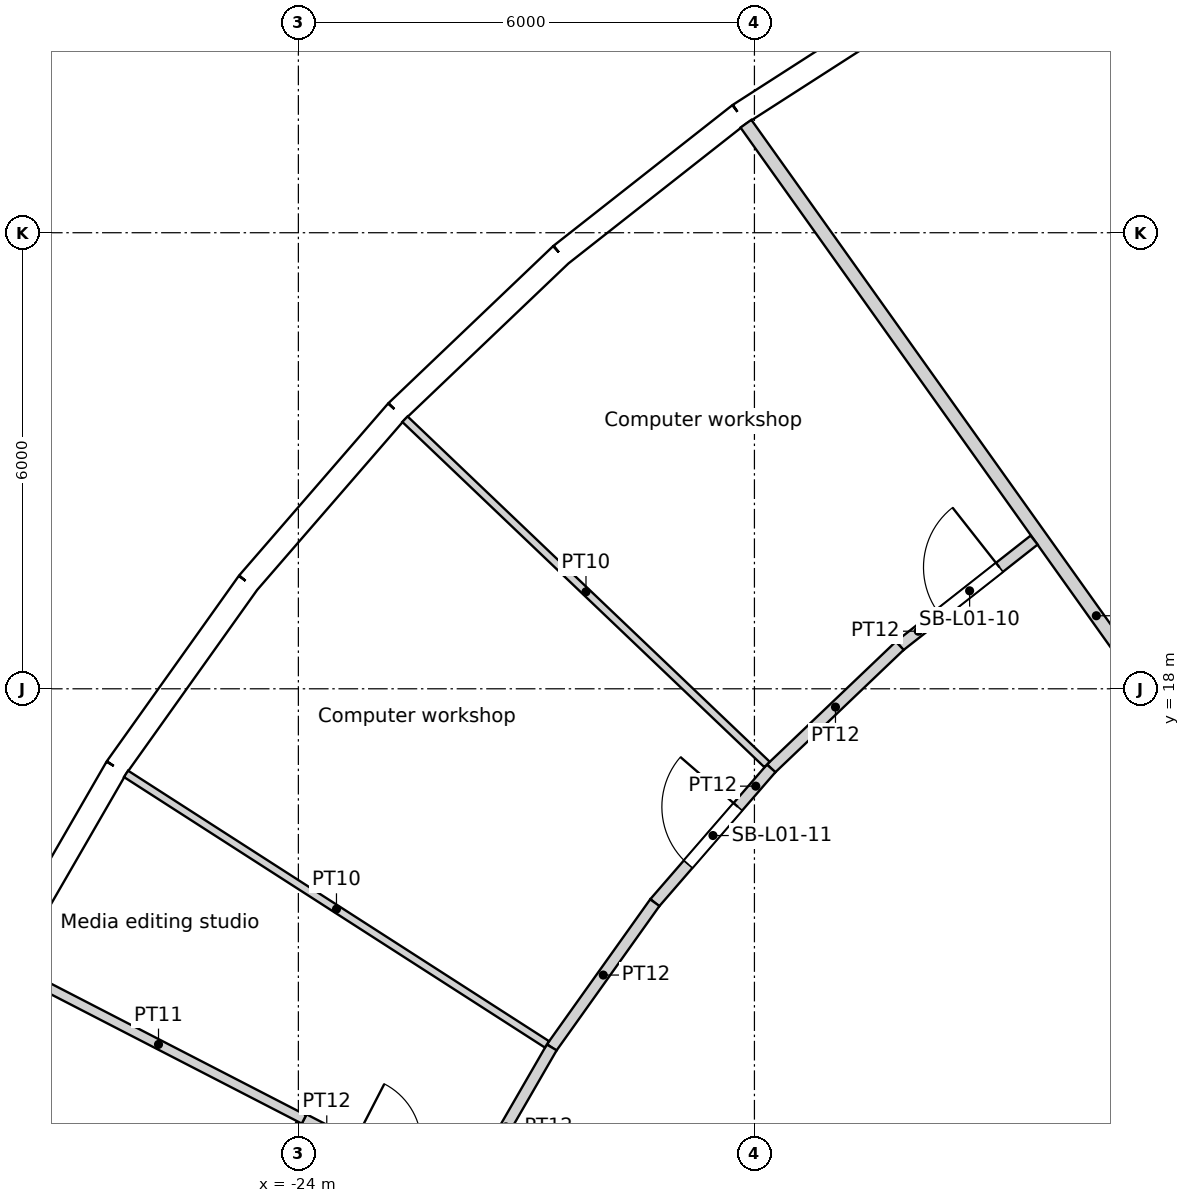
"""IFC4 building model, lengths in metres.
Left out: names, types, materials, properties, quantities, classifications, styles, units other than length and angle.
Written with IfcOpenShell. Run it as: python <this file> out.ifc"""

import sys

from ifc_helpers import new_model, si_unit, direction, frame, frame_2d, origin, origin_2d, place, context, subcontext, project, spatial, rectangle, circle, extrude, element, fill, save


model = new_model("IFC4")
c1 = context("Model", 3, precision=1e-05, world=origin(), true_north=direction((0.0, 1.0)))
c2 = subcontext(c1, "Body", "Model", "MODEL_VIEW")
j1 = project(units=[si_unit("LENGTHUNIT", "METRE"), si_unit("PLANEANGLEUNIT", "RADIAN")], contexts=[c1])
p1 = place(None, origin())
s1 = spatial("IfcSite", under=j1, at=p1, CompositionType="ELEMENT")
p2 = place(p1, origin())
s2 = spatial("IfcBuilding", under=s1, at=p2, CompositionType="ELEMENT")
p3 = place(p2, frame((0.0, 0.0, 9.0)))
s3 = spatial("IfcBuildingStorey", under=s2, at=p3, CompositionType="ELEMENT", Elevation=9.0)
for number, where, z_axis, x_axis in (
    (1, (-15.137, 26.219, 0.0), (0.0, 0.0, 1.0), (1.0, 0.0, 0.0)),
    (2, (-19.826, 22.88, 0.0), (0.0, 0.0, 1.0), (1.0, 0.0, 0.0)),
    (3, (-23.797, 18.715, 0.0), (0.0, 0.0, 1.0), (1.0, 0.0, 0.0)),
    (4, (-26.909, 13.873, 0.0), (0.0, 0.0, 1.0), (1.0, 0.0, 0.0)),
):
    element("IfcColumn", number, at=place(p3, frame(where, z_axis=z_axis, x_axis=x_axis)), inside=s3, PredefinedType="COLUMN", context=c2, shape_type="SweptSolid", body=[
        extrude(circle(Radius=0.7, at=origin_2d()), origin(), (0.0, 0.0, 1.0), 4.8),
    ])
for number, where, z_axis, x_axis in (
    (5, (-16.846, 17.855, 0.0), (0.0, 0.0, 1.0), (1.0, 0.0, 0.0)),
    (6, (-20.509, 13.489, 0.0), (0.0, 0.0, 1.0), (1.0, 0.0, 0.0)),
):
    element("IfcColumn", number, at=place(p3, frame(where, z_axis=z_axis, x_axis=x_axis)), inside=s3, PredefinedType="COLUMN", context=c2, shape_type="SweptSolid", body=[
        extrude(circle(Radius=0.75, at=origin_2d()), origin(), (0.0, 0.0, 1.0), 4.8),
    ])
p4 = place(p3, frame((-13.798, 12.802, 0.0), z_axis=(0.0, 0.0, 1.0), x_axis=(1.0, 0.0, 0.0)))
e7 = element("IfcColumn", 7, at=p4, inside=s3, PredefinedType="COLUMN", context=c2, shape_type="SweptSolid", body=[
    extrude(circle(Radius=0.8, at=origin_2d()), origin(), (0.0, 0.0, 1.0), 4.8),
])
p5 = place(p3, frame((-15.687, 27.171, 0.0), z_axis=(0.0, 0.0, 1.0), x_axis=(-0.841242231846, -0.540658401727, 0.0)))
e8 = element("IfcWall", 8, at=p5, inside=s3, PredefinedType="SOLIDWALL", context=c2, shape_type="SweptSolid", body=[
    extrude(rectangle(XDim=2.986, YDim=0.3, at=frame_2d((1.493, 0.0))), origin(), (0.0, 0.0, 1.0), 4.35),
])
p6 = place(p5, frame((1.493, 0.0, 2.0)))
e9 = element("IfcOpeningElement", 9, at=p6, cuts=e8, PredefinedType="OPENING", context=c2, shape_type="SweptSolid", body=[
    extrude(circle(Radius=1.2, at=origin_2d()), frame((0.0, 0.16, 0.0), z_axis=(0.0, -1.0, 0.0), x_axis=(1.0, 0.0, 0.0)), (0.0, 0.0, 1.0), 0.32),
])
p7 = place(p3, frame((-18.199, 25.557, 0.0), z_axis=(0.0, 0.0, 1.0), x_axis=(-0.786043032847, -0.618171780747, 0.0)))
e10 = element("IfcWall", 10, at=p7, inside=s3, PredefinedType="SOLIDWALL", context=c2, shape_type="SweptSolid", body=[
    extrude(rectangle(XDim=2.986, YDim=0.3, at=frame_2d((1.493, 0.0))), origin(), (0.0, 0.0, 1.0), 4.35),
])
p8 = place(p7, frame((1.493, 0.0, 2.0)))
e11 = element("IfcOpeningElement", 11, at=p8, cuts=e10, PredefinedType="OPENING", context=c2, shape_type="SweptSolid", body=[
    extrude(circle(Radius=1.2, at=origin_2d()), frame((0.0, 0.16, 0.0), z_axis=(0.0, -1.0, 0.0), x_axis=(1.0, 0.0, 0.0)), (0.0, 0.0, 1.0), 0.32),
])
p9 = place(p3, frame((-20.546, 23.711, 0.0), z_axis=(0.0, 0.0, 1.0), x_axis=(-0.723750841228, -0.690061388444, 0.0)))
e12 = element("IfcWall", 12, at=p9, inside=s3, PredefinedType="SOLIDWALL", context=c2, shape_type="SweptSolid", body=[
    extrude(rectangle(XDim=2.986, YDim=0.3, at=frame_2d((1.493, 0.0))), origin(), (0.0, 0.0, 1.0), 4.35),
])
p10 = place(p9, frame((1.493, 0.0, 2.0)))
e13 = element("IfcOpeningElement", 13, at=p10, cuts=e12, PredefinedType="OPENING", context=c2, shape_type="SweptSolid", body=[
    extrude(circle(Radius=1.2, at=origin_2d()), frame((0.0, 0.16, 0.0), z_axis=(0.0, -1.0, 0.0), x_axis=(1.0, 0.0, 0.0)), (0.0, 0.0, 1.0), 0.32),
])
p11 = place(p3, frame((-22.707, 21.651, 0.0), z_axis=(0.0, 0.0, 1.0), x_axis=(-0.654809121128, -0.755794294029, 0.0)))
e14 = element("IfcWall", 14, at=p11, inside=s3, PredefinedType="SOLIDWALL", context=c2, shape_type="SweptSolid", body=[
    extrude(rectangle(XDim=2.986, YDim=0.3, at=frame_2d((1.493, 0.0))), origin(), (0.0, 0.0, 1.0), 4.35),
])
p12 = place(p11, frame((1.493, 0.0, 2.0)))
e15 = element("IfcOpeningElement", 15, at=p12, cuts=e14, PredefinedType="OPENING", context=c2, shape_type="SweptSolid", body=[
    extrude(circle(Radius=1.2, at=origin_2d()), frame((0.0, 0.16, 0.0), z_axis=(0.0, -1.0, 0.0), x_axis=(1.0, 0.0, 0.0)), (0.0, 0.0, 1.0), 0.32),
])
p13 = place(p3, frame((-24.662, 19.394, 0.0), z_axis=(0.0, 0.0, 1.0), x_axis=(-0.580100533892, -0.814544885551, 0.0)))
e16 = element("IfcWall", 16, at=p13, inside=s3, PredefinedType="SOLIDWALL", context=c2, shape_type="SweptSolid", body=[
    extrude(rectangle(XDim=2.986, YDim=0.3, at=frame_2d((1.493, 0.0))), origin(), (0.0, 0.0, 1.0), 4.35),
])
p14 = place(p13, frame((1.493, 0.0, 2.0)))
e17 = element("IfcOpeningElement", 17, at=p14, cuts=e16, PredefinedType="OPENING", context=c2, shape_type="SweptSolid", body=[
    extrude(circle(Radius=1.2, at=origin_2d()), frame((0.0, 0.16, 0.0), z_axis=(0.0, -1.0, 0.0), x_axis=(1.0, 0.0, 0.0)), (0.0, 0.0, 1.0), 0.32),
])
p15 = place(p3, frame((-26.394, 16.962, 0.0), z_axis=(0.0, 0.0, 1.0), x_axis=(-0.500017373705, -0.866015372839, 0.0)))
e18 = element("IfcWall", 18, at=p15, inside=s3, PredefinedType="SOLIDWALL", context=c2, shape_type="SweptSolid", body=[
    extrude(rectangle(XDim=2.986, YDim=0.3, at=frame_2d((1.493, 0.0))), origin(), (0.0, 0.0, 1.0), 4.35),
])
p16 = place(p15, frame((1.493, 0.0, 2.0)))
e19 = element("IfcOpeningElement", 19, at=p16, cuts=e18, PredefinedType="OPENING", context=c2, shape_type="SweptSolid", body=[
    extrude(circle(Radius=1.2, at=origin_2d()), frame((0.0, 0.16, 0.0), z_axis=(0.0, -1.0, 0.0), x_axis=(1.0, 0.0, 0.0)), (0.0, 0.0, 1.0), 0.32),
])
p17 = place(p3, frame((-27.753, 14.308, 0.0), z_axis=(0.0, 0.0, 1.0), x_axis=(0.888823380171, -0.458249930563, 0.0)))
e20 = element("IfcWall", 20, at=p17, inside=s3, PredefinedType="PARTITIONING", context=c2, shape_type="SweptSolid", body=[
    extrude(rectangle(XDim=4.305, YDim=0.125, at=frame_2d((2.152, 0.0))), origin(), (0.0, 0.0, 1.0), 3.75),
])
p18 = place(p3, frame((-26.268, 16.881, 0.0), z_axis=(0.0, 0.0, 1.0), x_axis=(0.841267639797, -0.540618865959, 0.0)))
e21 = element("IfcWall", 21, at=p18, inside=s3, PredefinedType="PARTITIONING", context=c2, shape_type="SweptSolid", body=[
    extrude(rectangle(XDim=6.583, YDim=0.1, at=frame_2d((3.291, 0.0))), origin(), (0.0, 0.0, 1.0), 3.75),
])
p19 = place(p3, frame((-24.991, 10.005, 0.0), z_axis=(0.0, 0.0, 1.0), x_axis=(0.415481321012, 0.90960171058, 0.0)))
e22 = element("IfcWall", 22, at=p19, inside=s3, PredefinedType="PARTITIONING", context=c2, shape_type="SweptSolid", body=[
    extrude(rectangle(XDim=2.487, YDim=0.15, at=frame_2d((1.243, 0.0))), origin(), (0.0, 0.0, 1.0), 3.75),
])
p20 = place(p19, frame((0.831, 0.0, 0.0)))
e23 = element("IfcOpeningElement", 23, at=p20, cuts=e22, PredefinedType="OPENING", context=c2, shape_type="SweptSolid", body=[
    extrude(rectangle(XDim=0.9, YDim=2.1, at=frame_2d((0.45, 1.05))), frame((0.0, 0.075, 0.0), z_axis=(0.0, -1.0, 0.0), x_axis=(1.0, 0.0, 0.0)), (0.0, 0.0, 1.0), 0.15),
])
p21 = place(p3, frame((-23.927, 12.335, 0.0), z_axis=(0.0, 0.0, 1.0), x_axis=(0.888827725997, -0.458241501283, 0.0)))
e24 = element("IfcWall", 24, at=p21, inside=s3, PredefinedType="PARTITIONING", context=c2, shape_type="SweptSolid", body=[
    extrude(rectangle(XDim=2.278, YDim=0.15, at=frame_2d((1.139, 0.0))), origin(), (0.0, 0.0, 1.0), 3.75),
])
p22 = place(p21, frame((0.726, 0.0, 0.0)))
e25 = element("IfcOpeningElement", 25, at=p22, cuts=e24, PredefinedType="OPENING", context=c2, shape_type="SweptSolid", body=[
    extrude(rectangle(XDim=0.9, YDim=2.1, at=frame_2d((0.45, 1.05))), frame((0.0, 0.075, 0.0), z_axis=(0.0, -1.0, 0.0), x_axis=(1.0, 0.0, 0.0)), (0.0, 0.0, 1.0), 0.15),
])
p23 = place(p3, frame((-22.598, 21.547, 0.0), z_axis=(0.0, 0.0, 1.0), x_axis=(0.723762960711, -0.690048677054, 0.0)))
e26 = element("IfcWall", 26, at=p23, inside=s3, PredefinedType="PARTITIONING", context=c2, shape_type="SweptSolid", body=[
    extrude(rectangle(XDim=6.583, YDim=0.1, at=frame_2d((3.291, 0.0))), origin(), (0.0, 0.0, 1.0), 3.75),
])
p24 = place(p3, frame((-20.667, 13.282, 0.0), z_axis=(0.0, 0.0, 1.0), x_axis=(-0.50003483453, -0.866005291125, 0.0)))
e27 = element("IfcWall", 27, at=p24, inside=s3, PredefinedType="PARTITIONING", context=c2, shape_type="SweptSolid", body=[
    extrude(rectangle(XDim=2.413, YDim=0.15, at=frame_2d((1.207, 0.0))), origin(), (0.0, 0.0, 1.0), 3.75),
])
p25 = place(p3, frame((-19.311, 15.186, 0.0), z_axis=(0.0, 0.0, 1.0), x_axis=(-0.580032319147, -0.814593462252, 0.0)))
e28 = element("IfcWall", 28, at=p25, inside=s3, PredefinedType="PARTITIONING", context=c2, shape_type="SweptSolid", body=[
    extrude(rectangle(XDim=2.338, YDim=0.15, at=frame_2d((1.169, 0.0))), origin(), (0.0, 0.0, 1.0), 3.75),
])
p26 = place(p3, frame((-18.112, 25.435, 0.0), z_axis=(0.0, 0.0, 1.0), x_axis=(0.580054828861, -0.814577433713, 0.0)))
e29 = element("IfcWall", 29, at=p26, inside=s3, PredefinedType="PARTITIONING", context=c2, shape_type="SweptSolid", body=[
    extrude(rectangle(XDim=15.894, YDim=0.175, at=frame_2d((7.947, 0.0))), origin(), (0.0, 0.0, 1.0), 3.75),
])
p27 = place(p3, frame((-19.311, 15.186, 0.0), z_axis=(0.0, 0.0, 1.0), x_axis=(0.654866925236, 0.755744209526, 0.0)))
e30 = element("IfcWall", 30, at=p27, inside=s3, PredefinedType="PARTITIONING", context=c2, shape_type="SweptSolid", body=[
    extrude(rectangle(XDim=2.338, YDim=0.15, at=frame_2d((1.169, 0.0))), origin(), (0.0, 0.0, 1.0), 3.75),
])
p28 = place(p27, frame((0.669, 0.0, 0.0)))
e31 = element("IfcOpeningElement", 31, at=p28, cuts=e30, PredefinedType="OPENING", context=c2, shape_type="SweptSolid", body=[
    extrude(rectangle(XDim=1.0, YDim=2.1, at=frame_2d((0.5, 1.05))), frame((0.0, 0.075, 0.0), z_axis=(0.0, -1.0, 0.0), x_axis=(1.0, 0.0, 0.0)), (0.0, 0.0, 1.0), 0.15),
])
p29 = place(p3, frame((-16.088, 18.566, 0.0), z_axis=(0.0, 0.0, 1.0), x_axis=(-0.723668407542, -0.690147836283, 0.0)))
e32 = element("IfcWall", 32, at=p29, inside=s3, PredefinedType="PARTITIONING", context=c2, shape_type="SweptSolid", body=[
    extrude(rectangle(XDim=2.338, YDim=0.15, at=frame_2d((1.169, 0.0))), origin(), (0.0, 0.0, 1.0), 3.75),
])
p30 = place(p3, frame((-16.088, 18.566, 0.0), z_axis=(0.0, 0.0, 1.0), x_axis=(0.786084691739, 0.618118805258, 0.0)))
e33 = element("IfcWall", 33, at=p30, inside=s3, PredefinedType="PARTITIONING", context=c2, shape_type="SweptSolid", body=[
    extrude(rectangle(XDim=2.249, YDim=0.15, at=frame_2d((1.124, 0.0))), origin(), (0.0, 0.0, 1.0), 3.75),
])
p31 = place(p30, frame((0.669, 0.0, 0.0)))
e34 = element("IfcOpeningElement", 34, at=p31, cuts=e33, PredefinedType="OPENING", context=c2, shape_type="SweptSolid", body=[
    extrude(rectangle(XDim=1.0, YDim=2.1, at=frame_2d((0.5, 1.05))), frame((0.0, 0.075, 0.0), z_axis=(0.0, -1.0, 0.0), x_axis=(1.0, 0.0, 0.0)), (0.0, 0.0, 1.0), 0.15),
])
p32 = place(p6, origin())
e35 = element("IfcWindow", 35, at=p32, inside=s3, PartitioningType="SINGLE_PANEL", PredefinedType="WINDOW", context=c2, shape_type="SweptSolid", body=[
    extrude(circle(Radius=1.2, at=origin_2d()), frame((0.0, 0.12, 0.0), z_axis=(0.0, -1.0, 0.0), x_axis=(1.0, 0.0, 0.0)), (0.0, 0.0, 1.0), 0.1),
])
fill(e9, e35)
p33 = place(p8, origin())
e36 = element("IfcWindow", 36, at=p33, inside=s3, PartitioningType="SINGLE_PANEL", PredefinedType="WINDOW", context=c2, shape_type="SweptSolid", body=[
    extrude(circle(Radius=1.2, at=origin_2d()), frame((0.0, 0.12, 0.0), z_axis=(0.0, -1.0, 0.0), x_axis=(1.0, 0.0, 0.0)), (0.0, 0.0, 1.0), 0.1),
])
fill(e11, e36)
p34 = place(p10, origin())
e37 = element("IfcWindow", 37, at=p34, inside=s3, PartitioningType="SINGLE_PANEL", PredefinedType="WINDOW", context=c2, shape_type="SweptSolid", body=[
    extrude(circle(Radius=1.2, at=origin_2d()), frame((0.0, 0.12, 0.0), z_axis=(0.0, -1.0, 0.0), x_axis=(1.0, 0.0, 0.0)), (0.0, 0.0, 1.0), 0.1),
])
fill(e13, e37)
p35 = place(p12, origin())
e38 = element("IfcWindow", 38, at=p35, inside=s3, PartitioningType="SINGLE_PANEL", PredefinedType="WINDOW", context=c2, shape_type="SweptSolid", body=[
    extrude(circle(Radius=1.2, at=origin_2d()), frame((0.0, 0.12, 0.0), z_axis=(0.0, -1.0, 0.0), x_axis=(1.0, 0.0, 0.0)), (0.0, 0.0, 1.0), 0.1),
])
fill(e15, e38)
p36 = place(p14, origin())
e39 = element("IfcWindow", 39, at=p36, inside=s3, PartitioningType="SINGLE_PANEL", PredefinedType="WINDOW", context=c2, shape_type="SweptSolid", body=[
    extrude(circle(Radius=1.2, at=origin_2d()), frame((0.0, 0.12, 0.0), z_axis=(0.0, -1.0, 0.0), x_axis=(1.0, 0.0, 0.0)), (0.0, 0.0, 1.0), 0.1),
])
fill(e17, e39)
p37 = place(p16, origin())
e40 = element("IfcWindow", 40, at=p37, inside=s3, PartitioningType="SINGLE_PANEL", PredefinedType="WINDOW", context=c2, shape_type="SweptSolid", body=[
    extrude(circle(Radius=1.2, at=origin_2d()), frame((0.0, 0.12, 0.0), z_axis=(0.0, -1.0, 0.0), x_axis=(1.0, 0.0, 0.0)), (0.0, 0.0, 1.0), 0.1),
])
fill(e19, e40)
p38 = place(p31, origin())
e41 = element("IfcDoor", 41, at=p38, inside=s3, OperationType="SINGLE_SWING_RIGHT", PredefinedType="DOOR", context=c2, shape_type="SweptSolid", body=[
    extrude(rectangle(XDim=1.0, YDim=2.1, at=frame_2d((0.5, 1.05))), frame((0.0, 0.025, 0.0), z_axis=(0.0, -1.0, 0.0), x_axis=(1.0, 0.0, 0.0)), (0.0, 0.0, 1.0), 0.05),
])
fill(e34, e41)
p39 = place(p28, origin())
e42 = element("IfcDoor", 42, at=p39, inside=s3, OperationType="SINGLE_SWING_RIGHT", PredefinedType="DOOR", context=c2, shape_type="SweptSolid", body=[
    extrude(rectangle(XDim=1.0, YDim=2.1, at=frame_2d((0.5, 1.05))), frame((0.0, 0.025, 0.0), z_axis=(0.0, -1.0, 0.0), x_axis=(1.0, 0.0, 0.0)), (0.0, 0.0, 1.0), 0.05),
])
fill(e31, e42)
save(model, sys.argv[1])
